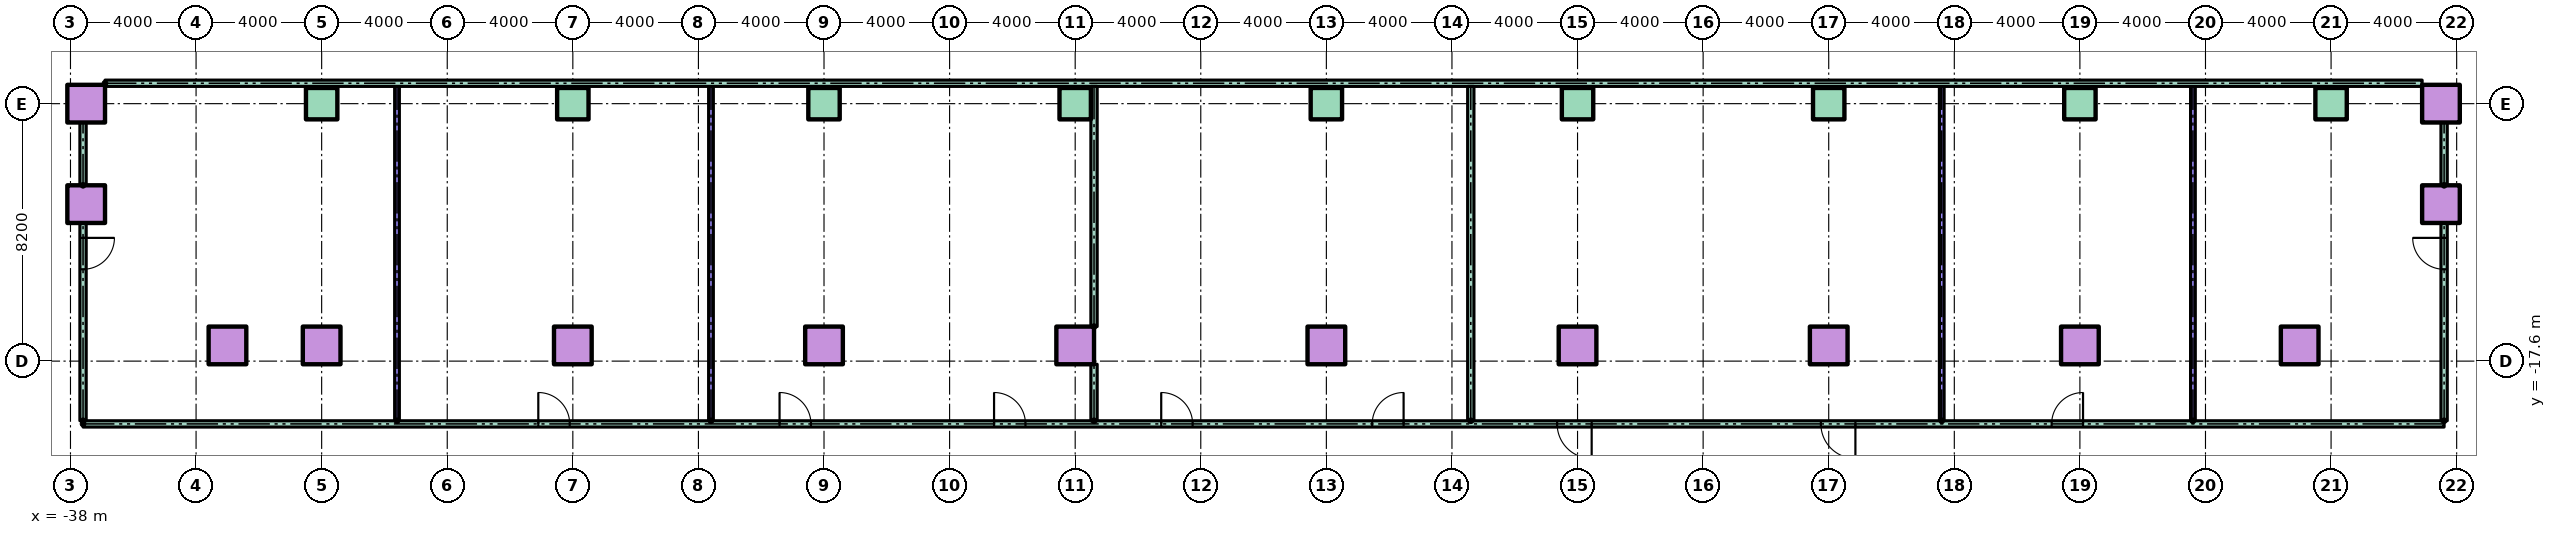
"""IFC4 building model, lengths in metres.
Left out: names, types, materials, properties, quantities, classifications, styles, units other than length and angle.
Written with IfcOpenShell. Run it as: python <this file> out.ifc"""

import sys

from ifc_helpers import new_model, si_unit, direction, frame, frame_2d, origin, origin_2d, place, context, subcontext, project, spatial, rectangle, hollow_rectangle, extrude, element, fill, save


model = new_model("IFC4")
c1 = context("Model", 3, precision=1e-05, world=origin(), true_north=direction((0.0, 1.0)))
c2 = subcontext(c1, "Body", "Model", "MODEL_VIEW")
j1 = project(units=[si_unit("LENGTHUNIT", "METRE"), si_unit("PLANEANGLEUNIT", "RADIAN")], contexts=[c1])
p1 = place(None, origin())
s1 = spatial("IfcSite", under=j1, at=p1, CompositionType="ELEMENT")
p2 = place(p1, origin())
s2 = spatial("IfcBuilding", under=s1, at=p2, CompositionType="ELEMENT")
p3 = place(p2, frame((0.0, 0.0, 6.0)))
s3 = spatial("IfcBuildingStorey", under=s2, at=p3, CompositionType="ELEMENT", Elevation=6.0)
for number, where in (
    (1, (-33.0, -17.1, 0.0)),
    (2, (-30.0, -17.1, 0.0)),
    (3, (-22.0, -17.1, 0.0)),
    (4, (-14.0, -17.1, 0.0)),
    (5, (-6.0, -17.1, 0.0)),
    (6, (2.0, -17.1, 0.0)),
    (7, (10.0, -17.1, 0.0)),
    (8, (18.0, -17.1, 0.0)),
    (9, (26.0, -17.1, 0.0)),
    (10, (33.0, -17.1, 0.0)),
    (11, (-37.5, -12.6, 0.0)),
    (12, (37.5, -12.6, 0.0)),
    (13, (-37.5, -9.4, 0.0)),
):
    element("IfcColumn", number, at=place(p3, frame(where)), inside=s3, PredefinedType="COLUMN", context=c2, shape_type="SweptSolid", body=[
        extrude(hollow_rectangle(XDim=1.2, YDim=1.2, WallThickness=0.06, at=origin_2d()), origin(), (0.0, 0.0, 1.0), 4.0),
    ])
for number, where in (
    (14, (-30.0, -9.4, 0.0)),
    (15, (-22.0, -9.4, 0.0)),
    (16, (-14.0, -9.4, 0.0)),
    (17, (-6.0, -9.4, 0.0)),
    (18, (2.0, -9.4, 0.0)),
    (19, (10.0, -9.4, 0.0)),
    (20, (18.0, -9.4, 0.0)),
    (21, (26.0, -9.4, 0.0)),
    (22, (34.0, -9.4, 0.0)),
):
    element("IfcColumn", number, at=place(p3, frame(where)), inside=s3, PredefinedType="COLUMN", context=c2, shape_type="SweptSolid", body=[
        extrude(rectangle(XDim=1.0, YDim=1.0, at=origin_2d()), origin(), (0.0, 0.0, 1.0), 4.0),
    ])
p4 = place(p3, frame((37.5, -9.4, 0.0)))
e23 = element("IfcColumn", 23, at=p4, inside=s3, PredefinedType="COLUMN", context=c2, shape_type="SweptSolid", body=[
    extrude(hollow_rectangle(XDim=1.2, YDim=1.2, WallThickness=0.06, at=origin_2d()), origin(), (0.0, 0.0, 1.0), 4.0),
])
p5 = place(p3, frame((-37.6, -19.6, 0.0)))
e24 = element("IfcWall", 24, at=p5, inside=s3, PredefinedType="PARTITIONING", context=c2, shape_type="SweptSolid", body=[
    extrude(rectangle(XDim=75.2, YDim=0.2, at=frame_2d((37.6, 0.0))), origin(), (0.0, 0.0, 1.0), 3.7),
])
p6 = place(p5, frame((14.5, 0.0, 0.0)))
e25 = element("IfcOpeningElement", 25, at=p6, cuts=e24, PredefinedType="OPENING", context=c2, shape_type="SweptSolid", body=[
    extrude(rectangle(XDim=1.0, YDim=2.1, at=frame_2d((0.5, 1.05))), frame((0.0, 0.11, 0.0), z_axis=(0.0, -1.0, 0.0), x_axis=(1.0, 0.0, 0.0)), (0.0, 0.0, 1.0), 0.22),
])
p7 = place(p5, frame((22.184, 0.0, 0.0)))
e26 = element("IfcOpeningElement", 26, at=p7, cuts=e24, PredefinedType="OPENING", context=c2, shape_type="SweptSolid", body=[
    extrude(rectangle(XDim=1.0, YDim=2.1, at=frame_2d((0.5, 1.05))), frame((0.0, 0.11, 0.0), z_axis=(0.0, -1.0, 0.0), x_axis=(1.0, 0.0, 0.0)), (0.0, 0.0, 1.0), 0.22),
])
p8 = place(p5, frame((29.016, 0.0, 0.0)))
e27 = element("IfcOpeningElement", 27, at=p8, cuts=e24, PredefinedType="OPENING", context=c2, shape_type="SweptSolid", body=[
    extrude(rectangle(XDim=1.0, YDim=2.1, at=frame_2d((0.5, 1.05))), frame((0.0, 0.11, 0.0), z_axis=(0.0, -1.0, 0.0), x_axis=(1.0, 0.0, 0.0)), (0.0, 0.0, 1.0), 0.22),
])
p9 = place(p5, frame((34.34, 0.0, 0.0)))
e28 = element("IfcOpeningElement", 28, at=p9, cuts=e24, PredefinedType="OPENING", context=c2, shape_type="SweptSolid", body=[
    extrude(rectangle(XDim=1.0, YDim=2.1, at=frame_2d((0.5, 1.05))), frame((0.0, 0.11, 0.0), z_axis=(0.0, -1.0, 0.0), x_axis=(1.0, 0.0, 0.0)), (0.0, 0.0, 1.0), 0.22),
])
p10 = place(p5, frame((41.06, 0.0, 0.0)))
e29 = element("IfcOpeningElement", 29, at=p10, cuts=e24, PredefinedType="OPENING", context=c2, shape_type="SweptSolid", body=[
    extrude(rectangle(XDim=1.0, YDim=2.1, at=frame_2d((0.5, 1.05))), frame((0.0, 0.11, 0.0), z_axis=(0.0, -1.0, 0.0), x_axis=(1.0, 0.0, 0.0)), (0.0, 0.0, 1.0), 0.22),
])
p11 = place(p5, frame((46.95, 0.0, 0.0)))
e30 = element("IfcOpeningElement", 30, at=p11, cuts=e24, PredefinedType="OPENING", context=c2, shape_type="SweptSolid", body=[
    extrude(rectangle(XDim=1.1, YDim=2.1, at=frame_2d((0.55, 1.05))), frame((0.0, 0.11, 0.0), z_axis=(0.0, -1.0, 0.0), x_axis=(1.0, 0.0, 0.0)), (0.0, 0.0, 1.0), 0.22),
])
p12 = place(p5, frame((55.35, 0.0, 0.0)))
e31 = element("IfcOpeningElement", 31, at=p12, cuts=e24, PredefinedType="OPENING", context=c2, shape_type="SweptSolid", body=[
    extrude(rectangle(XDim=1.1, YDim=2.1, at=frame_2d((0.55, 1.05))), frame((0.0, 0.11, 0.0), z_axis=(0.0, -1.0, 0.0), x_axis=(1.0, 0.0, 0.0)), (0.0, 0.0, 1.0), 0.22),
])
p13 = place(p5, frame((62.7, 0.0, 0.0)))
e32 = element("IfcOpeningElement", 32, at=p13, cuts=e24, PredefinedType="OPENING", context=c2, shape_type="SweptSolid", body=[
    extrude(rectangle(XDim=1.0, YDim=2.1, at=frame_2d((0.5, 1.05))), frame((0.0, 0.11, 0.0), z_axis=(0.0, -1.0, 0.0), x_axis=(1.0, 0.0, 0.0)), (0.0, 0.0, 1.0), 0.22),
])
p14 = place(p3, frame((-36.9, -8.75, 0.0)))
e33 = element("IfcWall", 33, at=p14, inside=s3, PredefinedType="PARTITIONING", context=c2, shape_type="SweptSolid", body=[
    extrude(rectangle(XDim=73.8, YDim=0.2, at=frame_2d((36.9, 0.0))), origin(), (0.0, 0.0, 1.0), 3.7),
])
p15 = place(p3, frame((-37.6, -19.5, 0.0), z_axis=(0.0, 0.0, 1.0), x_axis=(0.0, 1.0, 0.0)))
e34 = element("IfcWall", 34, at=p15, inside=s3, PredefinedType="PARTITIONING", context=c2, shape_type="SweptSolid", body=[
    extrude(rectangle(XDim=6.3, YDim=0.2, at=frame_2d((3.15, 0.0))), origin(), (0.0, 0.0, 1.0), 3.7),
])
p16 = place(p15, frame((4.825, 0.0, 0.0)))
e35 = element("IfcOpeningElement", 35, at=p16, cuts=e34, PredefinedType="OPENING", context=c2, shape_type="SweptSolid", body=[
    extrude(rectangle(XDim=1.0, YDim=2.1, at=frame_2d((0.5, 1.05))), frame((0.0, 0.11, 0.0), z_axis=(0.0, -1.0, 0.0), x_axis=(1.0, 0.0, 0.0)), (0.0, 0.0, 1.0), 0.22),
])
p17 = place(p3, frame((-37.6, -12.0, 0.0), z_axis=(0.0, 0.0, 1.0), x_axis=(0.0, 1.0, 0.0)))
e36 = element("IfcWall", 36, at=p17, inside=s3, PredefinedType="PARTITIONING", context=c2, shape_type="SweptSolid", body=[
    extrude(rectangle(XDim=2.0, YDim=0.2, at=frame_2d((1.0, 0.0))), origin(), (0.0, 0.0, 1.0), 3.7),
])
for number, where, z_axis, x_axis in (
    (37, (-27.6, -19.5, 0.0), (0.0, 0.0, 1.0), (0.0, 1.0, 0.0)),
    (38, (-17.6, -19.5, 0.0), (0.0, 0.0, 1.0), (0.0, 1.0, 0.0)),
):
    element("IfcWall", number, at=place(p3, frame(where, z_axis=z_axis, x_axis=x_axis)), inside=s3, PredefinedType="PARTITIONING", context=c2, shape_type="SweptSolid", body=[
        extrude(rectangle(XDim=10.65, YDim=0.15, at=frame_2d((5.325, 0.0))), origin(), (0.0, 0.0, 1.0), 3.7),
    ])
p18 = place(p3, frame((-5.4, -19.5, 0.0), z_axis=(0.0, 0.0, 1.0), x_axis=(0.0, 1.0, 0.0)))
e39 = element("IfcWall", 39, at=p18, inside=s3, PredefinedType="PARTITIONING", context=c2, shape_type="SweptSolid", body=[
    extrude(rectangle(XDim=1.8, YDim=0.2, at=frame_2d((0.9, 0.0))), origin(), (0.0, 0.0, 1.0), 3.7),
])
p19 = place(p3, frame((-5.4, -16.5, 0.0), z_axis=(0.0, 0.0, 1.0), x_axis=(0.0, 1.0, 0.0)))
e40 = element("IfcWall", 40, at=p19, inside=s3, PredefinedType="PARTITIONING", context=c2, shape_type="SweptSolid", body=[
    extrude(rectangle(XDim=7.65, YDim=0.2, at=frame_2d((3.825, 0.0))), origin(), (0.0, 0.0, 1.0), 3.7),
])
p20 = place(p3, frame((6.6, -19.5, 0.0), z_axis=(0.0, 0.0, 1.0), x_axis=(0.0, 1.0, 0.0)))
e41 = element("IfcWall", 41, at=p20, inside=s3, PredefinedType="PARTITIONING", context=c2, shape_type="SweptSolid", body=[
    extrude(rectangle(XDim=10.65, YDim=0.2, at=frame_2d((5.325, 0.0))), origin(), (0.0, 0.0, 1.0), 3.7),
])
for number, where, z_axis, x_axis in (
    (42, (21.6, -19.5, 0.0), (0.0, 0.0, 1.0), (0.0, 1.0, 0.0)),
    (43, (29.6, -19.5, 0.0), (0.0, 0.0, 1.0), (0.0, 1.0, 0.0)),
):
    element("IfcWall", number, at=place(p3, frame(where, z_axis=z_axis, x_axis=x_axis)), inside=s3, PredefinedType="PARTITIONING", context=c2, shape_type="SweptSolid", body=[
        extrude(rectangle(XDim=10.65, YDim=0.15, at=frame_2d((5.325, 0.0))), origin(), (0.0, 0.0, 1.0), 3.7),
    ])
p21 = place(p3, frame((37.6, -19.5, 0.0), z_axis=(0.0, 0.0, 1.0), x_axis=(0.0, 1.0, 0.0)))
e44 = element("IfcWall", 44, at=p21, inside=s3, PredefinedType="PARTITIONING", context=c2, shape_type="SweptSolid", body=[
    extrude(rectangle(XDim=6.3, YDim=0.2, at=frame_2d((3.15, 0.0))), origin(), (0.0, 0.0, 1.0), 3.7),
])
p22 = place(p21, frame((4.825, 0.0, 0.0)))
e45 = element("IfcOpeningElement", 45, at=p22, cuts=e44, PredefinedType="OPENING", context=c2, shape_type="SweptSolid", body=[
    extrude(rectangle(XDim=1.0, YDim=2.1, at=frame_2d((0.5, 1.05))), frame((0.0, 0.11, 0.0), z_axis=(0.0, -1.0, 0.0), x_axis=(1.0, 0.0, 0.0)), (0.0, 0.0, 1.0), 0.22),
])
p23 = place(p3, frame((37.6, -12.0, 0.0), z_axis=(0.0, 0.0, 1.0), x_axis=(0.0, 1.0, 0.0)))
e46 = element("IfcWall", 46, at=p23, inside=s3, PredefinedType="PARTITIONING", context=c2, shape_type="SweptSolid", body=[
    extrude(rectangle(XDim=2.0, YDim=0.2, at=frame_2d((1.0, 0.0))), origin(), (0.0, 0.0, 1.0), 3.7),
])
p24 = place(p16, frame((1.0, 0.0, 0.0), z_axis=(0.0, 0.0, 1.0), x_axis=(-1.0, 0.0, 0.0)))
e47 = element("IfcDoor", 47, at=p24, inside=s3, OperationType="SINGLE_SWING_RIGHT", PredefinedType="DOOR", context=c2, shape_type="SweptSolid", body=[
    extrude(rectangle(XDim=1.0, YDim=2.1, at=frame_2d((0.5, 1.05))), frame((0.0, 0.025, 0.0), z_axis=(0.0, -1.0, 0.0), x_axis=(1.0, 0.0, 0.0)), (0.0, 0.0, 1.0), 0.05),
])
fill(e35, e47)
p25 = place(p6, origin())
e48 = element("IfcDoor", 48, at=p25, inside=s3, OperationType="SINGLE_SWING_LEFT", PredefinedType="DOOR", context=c2, shape_type="SweptSolid", body=[
    extrude(rectangle(XDim=1.0, YDim=2.1, at=frame_2d((0.5, 1.05))), frame((0.0, 0.025, 0.0), z_axis=(0.0, -1.0, 0.0), x_axis=(1.0, 0.0, 0.0)), (0.0, 0.0, 1.0), 0.05),
])
fill(e25, e48)
p26 = place(p7, origin())
e49 = element("IfcDoor", 49, at=p26, inside=s3, OperationType="SINGLE_SWING_LEFT", PredefinedType="DOOR", context=c2, shape_type="SweptSolid", body=[
    extrude(rectangle(XDim=1.0, YDim=2.1, at=frame_2d((0.5, 1.05))), frame((0.0, 0.025, 0.0), z_axis=(0.0, -1.0, 0.0), x_axis=(1.0, 0.0, 0.0)), (0.0, 0.0, 1.0), 0.05),
])
fill(e26, e49)
p27 = place(p8, origin())
e50 = element("IfcDoor", 50, at=p27, inside=s3, OperationType="SINGLE_SWING_LEFT", PredefinedType="DOOR", context=c2, shape_type="SweptSolid", body=[
    extrude(rectangle(XDim=1.0, YDim=2.1, at=frame_2d((0.5, 1.05))), frame((0.0, 0.025, 0.0), z_axis=(0.0, -1.0, 0.0), x_axis=(1.0, 0.0, 0.0)), (0.0, 0.0, 1.0), 0.05),
])
fill(e27, e50)
p28 = place(p9, origin())
e51 = element("IfcDoor", 51, at=p28, inside=s3, OperationType="SINGLE_SWING_LEFT", PredefinedType="DOOR", context=c2, shape_type="SweptSolid", body=[
    extrude(rectangle(XDim=1.0, YDim=2.1, at=frame_2d((0.5, 1.05))), frame((0.0, 0.025, 0.0), z_axis=(0.0, -1.0, 0.0), x_axis=(1.0, 0.0, 0.0)), (0.0, 0.0, 1.0), 0.05),
])
fill(e28, e51)
p29 = place(p10, origin())
e52 = element("IfcDoor", 52, at=p29, inside=s3, OperationType="SINGLE_SWING_RIGHT", PredefinedType="DOOR", context=c2, shape_type="SweptSolid", body=[
    extrude(rectangle(XDim=1.0, YDim=2.1, at=frame_2d((0.5, 1.05))), frame((0.0, 0.025, 0.0), z_axis=(0.0, -1.0, 0.0), x_axis=(1.0, 0.0, 0.0)), (0.0, 0.0, 1.0), 0.05),
])
fill(e29, e52)
p30 = place(p11, frame((1.1, 0.0, 0.0), z_axis=(0.0, 0.0, 1.0), x_axis=(-1.0, 0.0, 0.0)))
e53 = element("IfcDoor", 53, at=p30, inside=s3, OperationType="SINGLE_SWING_RIGHT", PredefinedType="DOOR", context=c2, shape_type="SweptSolid", body=[
    extrude(rectangle(XDim=1.1, YDim=2.1, at=frame_2d((0.55, 1.05))), frame((0.0, 0.025, 0.0), z_axis=(0.0, -1.0, 0.0), x_axis=(1.0, 0.0, 0.0)), (0.0, 0.0, 1.0), 0.05),
])
fill(e30, e53)
p31 = place(p12, frame((1.1, 0.0, 0.0), z_axis=(0.0, 0.0, 1.0), x_axis=(-1.0, 0.0, 0.0)))
e54 = element("IfcDoor", 54, at=p31, inside=s3, OperationType="SINGLE_SWING_RIGHT", PredefinedType="DOOR", context=c2, shape_type="SweptSolid", body=[
    extrude(rectangle(XDim=1.1, YDim=2.1, at=frame_2d((0.55, 1.05))), frame((0.0, 0.025, 0.0), z_axis=(0.0, -1.0, 0.0), x_axis=(1.0, 0.0, 0.0)), (0.0, 0.0, 1.0), 0.05),
])
fill(e31, e54)
p32 = place(p13, origin())
e55 = element("IfcDoor", 55, at=p32, inside=s3, OperationType="SINGLE_SWING_RIGHT", PredefinedType="DOOR", context=c2, shape_type="SweptSolid", body=[
    extrude(rectangle(XDim=1.0, YDim=2.1, at=frame_2d((0.5, 1.05))), frame((0.0, 0.025, 0.0), z_axis=(0.0, -1.0, 0.0), x_axis=(1.0, 0.0, 0.0)), (0.0, 0.0, 1.0), 0.05),
])
fill(e32, e55)
p33 = place(p22, origin())
e56 = element("IfcDoor", 56, at=p33, inside=s3, OperationType="SINGLE_SWING_RIGHT", PredefinedType="DOOR", context=c2, shape_type="SweptSolid", body=[
    extrude(rectangle(XDim=1.0, YDim=2.1, at=frame_2d((0.5, 1.05))), frame((0.0, 0.025, 0.0), z_axis=(0.0, -1.0, 0.0), x_axis=(1.0, 0.0, 0.0)), (0.0, 0.0, 1.0), 0.05),
])
fill(e45, e56)
save(model, sys.argv[1])
